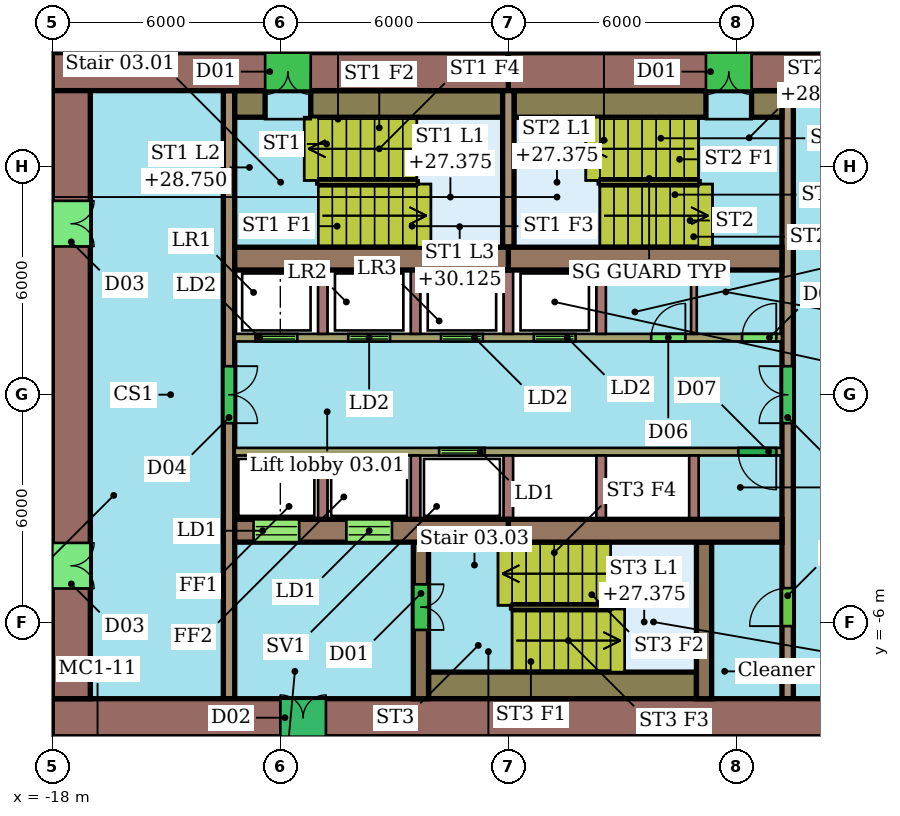
"""IFC4 building model, lengths in metres.
Left out: names, types, materials, properties, quantities, classifications, styles, units other than length and angle.
Written with IfcOpenShell. Run it as: python <this file> out.ifc"""

import sys

from ifc_helpers import new_model, si_unit, direction, frame, frame_2d, origin, place, context, subcontext, project, spatial, rectangle, extrude, element, fill, save


model = new_model("IFC4")
c1 = context("Model", 3, precision=1e-05, world=origin(), true_north=direction((0.0, 1.0)))
c2 = subcontext(c1, "Body", "Model", "MODEL_VIEW")
j1 = project(units=[si_unit("LENGTHUNIT", "METRE"), si_unit("PLANEANGLEUNIT", "RADIAN")], contexts=[c1])
p1 = place(None, origin())
s1 = spatial("IfcSite", under=j1, at=p1, CompositionType="ELEMENT")
p2 = place(p1, origin())
s2 = spatial("IfcBuilding", under=s1, at=p2, CompositionType="ELEMENT")
p3 = place(p2, frame((0.0, 0.0, 26.0)))
s3 = spatial("IfcBuildingStorey", under=s2, at=p3, CompositionType="ELEMENT", Elevation=26.0)
p4 = place(p3, frame((6.0, 8.5, 0.0), z_axis=(0.0, 0.0, 1.0), x_axis=(-1.0, 0.0, 0.0)))
e1 = element("IfcWall", 1, at=p4, inside=s3, PredefinedType="SHEAR", context=c2, shape_type="SweptSolid", body=[
    extrude(rectangle(XDim=12.0, YDim=1.0, at=frame_2d((6.0, 0.0))), origin(), (0.0, 0.0, 1.0), 5.2),
])
p5 = place(p4, frame((5.6, 0.0, 0.0)))
e2 = element("IfcOpeningElement", 2, at=p5, cuts=e1, PredefinedType="OPENING", context=c2, shape_type="SweptSolid", body=[
    extrude(rectangle(XDim=1.2, YDim=2.1, at=frame_2d((0.6, 1.05))), frame((0.0, 0.51, 0.0), z_axis=(0.0, -1.0, 0.0), x_axis=(1.0, 0.0, 0.0)), (0.0, 0.0, 1.0), 1.02),
])
p6 = place(p3, frame((-6.0, 8.5, 0.0), z_axis=(0.0, 0.0, 1.0), x_axis=(-1.0, 0.0, 0.0)))
e3 = element("IfcWall", 3, at=p6, inside=s3, PredefinedType="SHEAR", context=c2, shape_type="SweptSolid", body=[
    extrude(rectangle(XDim=12.0, YDim=1.0, at=frame_2d((6.0, 0.0))), origin(), (0.0, 0.0, 1.0), 5.2),
])
p7 = place(p6, frame((5.2, 0.0, 0.0)))
e4 = element("IfcOpeningElement", 4, at=p7, cuts=e3, PredefinedType="OPENING", context=c2, shape_type="SweptSolid", body=[
    extrude(rectangle(XDim=1.2, YDim=2.1, at=frame_2d((0.6, 1.05))), frame((0.0, 0.51, 0.0), z_axis=(0.0, -1.0, 0.0), x_axis=(1.0, 0.0, 0.0)), (0.0, 0.0, 1.0), 1.02),
])
p8 = place(p3, frame((-18.0, -8.5, 0.0), z_axis=(0.0, 0.0, 1.0), x_axis=(1.0, 0.0, 0.0)))
e5 = element("IfcWall", 5, at=p8, inside=s3, PredefinedType="SHEAR", context=c2, shape_type="SweptSolid", body=[
    extrude(rectangle(XDim=24.0, YDim=1.0, at=frame_2d((12.0, 0.0))), origin(), (0.0, 0.0, 1.0), 5.2),
])
p9 = place(p8, frame((6.0, 0.0, 0.0)))
e6 = element("IfcOpeningElement", 6, at=p9, cuts=e5, PredefinedType="OPENING", context=c2, shape_type="SweptSolid", body=[
    extrude(rectangle(XDim=1.2, YDim=2.1, at=frame_2d((0.6, 1.05))), frame((0.0, 0.51, 0.0), z_axis=(0.0, -1.0, 0.0), x_axis=(1.0, 0.0, 0.0)), (0.0, 0.0, 1.0), 1.02),
])
p10 = place(p3, frame((-17.5, 8.0, 0.0), z_axis=(0.0, 0.0, 1.0), x_axis=(0.0, -1.0, 0.0)))
e7 = element("IfcWall", 7, at=p10, inside=s3, PredefinedType="SHEAR", context=c2, shape_type="SweptSolid", body=[
    extrude(rectangle(XDim=16.0, YDim=1.0, at=frame_2d((8.0, 0.0))), origin(), (0.0, 0.0, 1.0), 5.2),
])
p11 = place(p10, frame((11.9, 0.0, 0.0)))
e8 = element("IfcOpeningElement", 8, at=p11, cuts=e7, PredefinedType="OPENING", context=c2, shape_type="SweptSolid", body=[
    extrude(rectangle(XDim=1.2, YDim=2.1, at=frame_2d((0.6, 1.05))), frame((0.0, 0.51, 0.0), z_axis=(0.0, -1.0, 0.0), x_axis=(1.0, 0.0, 0.0)), (0.0, 0.0, 1.0), 1.02),
])
p12 = place(p10, frame((2.9, 0.0, 0.0)))
e9 = element("IfcOpeningElement", 9, at=p12, cuts=e7, PredefinedType="OPENING", context=c2, shape_type="SweptSolid", body=[
    extrude(rectangle(XDim=1.2, YDim=2.1, at=frame_2d((0.6, 1.05))), frame((0.0, 0.51, 0.0), z_axis=(0.0, -1.0, 0.0), x_axis=(1.0, 0.0, 0.0)), (0.0, 0.0, 1.0), 1.02),
])
for number, where, z_axis, x_axis in (
    (10, (-13.2, 3.58, 0.0), (0.0, 0.0, 1.0), (1.0, 0.0, 0.0)),
    (11, (-6.0, 3.58, 0.0), (0.0, 0.0, 1.0), (1.0, 0.0, 0.0)),
):
    element("IfcWall", number, at=place(p3, frame(where, z_axis=z_axis, x_axis=x_axis)), inside=s3, PredefinedType="SHEAR", context=c2, shape_type="SweptSolid", body=[
        extrude(rectangle(XDim=7.2, YDim=0.6, at=frame_2d((3.6, 0.0))), origin(), (0.0, 0.0, 1.0), 5.2),
    ])
p13 = place(p3, frame((-13.2, -3.58, 0.0), z_axis=(0.0, 0.0, 1.0), x_axis=(1.0, 0.0, 0.0)))
e12 = element("IfcWall", 12, at=p13, inside=s3, PredefinedType="SHEAR", context=c2, shape_type="SweptSolid", body=[
    extrude(rectangle(XDim=7.2, YDim=0.6, at=frame_2d((3.6, 0.0))), origin(), (0.0, 0.0, 1.0), 5.2),
])
p14 = place(p13, frame((0.496, 0.0, 0.0)))
e13 = element("IfcOpeningElement", 13, at=p14, cuts=e12, PredefinedType="OPENING", context=c2, shape_type="SweptSolid", body=[
    extrude(rectangle(XDim=1.2, YDim=2.1, at=frame_2d((0.6, 1.05))), frame((0.0, 0.31, 0.0), z_axis=(0.0, -1.0, 0.0), x_axis=(1.0, 0.0, 0.0)), (0.0, 0.0, 1.0), 0.62),
])
p15 = place(p13, frame((2.938, 0.0, 0.0)))
e14 = element("IfcOpeningElement", 14, at=p15, cuts=e12, PredefinedType="OPENING", context=c2, shape_type="SweptSolid", body=[
    extrude(rectangle(XDim=1.2, YDim=2.1, at=frame_2d((0.6, 1.05))), frame((0.0, 0.31, 0.0), z_axis=(0.0, -1.0, 0.0), x_axis=(1.0, 0.0, 0.0)), (0.0, 0.0, 1.0), 0.62),
])
p16 = place(p3, frame((-6.0, -3.58, 0.0), z_axis=(0.0, 0.0, 1.0), x_axis=(1.0, 0.0, 0.0)))
e15 = element("IfcWall", 15, at=p16, inside=s3, PredefinedType="SHEAR", context=c2, shape_type="SweptSolid", body=[
    extrude(rectangle(XDim=7.2, YDim=0.6, at=frame_2d((3.6, 0.0))), origin(), (0.0, 0.0, 1.0), 5.2),
])
p17 = place(p3, frame((-13.35, 8.0, 0.0), z_axis=(0.0, 0.0, 1.0), x_axis=(0.0, -1.0, 0.0)))
e16 = element("IfcWall", 16, at=p17, inside=s3, PredefinedType="SHEAR", context=c2, shape_type="SweptSolid", body=[
    extrude(rectangle(XDim=16.0, YDim=0.3, at=frame_2d((8.0, 0.0))), origin(), (0.0, 0.0, 1.0), 5.2),
])
p18 = place(p17, frame((7.25, 0.0, 0.0)))
e17 = element("IfcOpeningElement", 17, at=p18, cuts=e16, PredefinedType="OPENING", context=c2, shape_type="SweptSolid", body=[
    extrude(rectangle(XDim=1.5, YDim=2.1, at=frame_2d((0.75, 1.05))), frame((0.0, 0.16, 0.0), z_axis=(0.0, -1.0, 0.0), x_axis=(1.0, 0.0, 0.0)), (0.0, 0.0, 1.0), 0.32),
])
p19 = place(p3, frame((1.35, -8.0, 0.0), z_axis=(0.0, 0.0, 1.0), x_axis=(0.0, 1.0, 0.0)))
e18 = element("IfcWall", 18, at=p19, inside=s3, PredefinedType="SHEAR", context=c2, shape_type="SweptSolid", body=[
    extrude(rectangle(XDim=16.0, YDim=0.3, at=frame_2d((8.0, 0.0))), origin(), (0.0, 0.0, 1.0), 5.2),
])
p20 = place(p19, frame((1.91, 0.0, 0.0)))
e19 = element("IfcOpeningElement", 19, at=p20, cuts=e18, PredefinedType="OPENING", context=c2, shape_type="SweptSolid", body=[
    extrude(rectangle(XDim=1.0, YDim=2.1, at=frame_2d((0.5, 1.05))), frame((0.0, 0.16, 0.0), z_axis=(0.0, -1.0, 0.0), x_axis=(1.0, 0.0, 0.0)), (0.0, 0.0, 1.0), 0.32),
])
p21 = place(p19, frame((7.25, 0.0, 0.0)))
e20 = element("IfcOpeningElement", 20, at=p21, cuts=e18, PredefinedType="OPENING", context=c2, shape_type="SweptSolid", body=[
    extrude(rectangle(XDim=1.5, YDim=2.1, at=frame_2d((0.75, 1.05))), frame((0.0, 0.16, 0.0), z_axis=(0.0, -1.0, 0.0), x_axis=(1.0, 0.0, 0.0)), (0.0, 0.0, 1.0), 0.32),
])
p22 = place(p3, frame((-13.2, 1.5, 0.0), z_axis=(0.0, 0.0, 1.0), x_axis=(1.0, 0.0, 0.0)))
e21 = element("IfcWall", 21, at=p22, inside=s3, PredefinedType="SHEAR", context=c2, shape_type="SweptSolid", body=[
    extrude(rectangle(XDim=14.4, YDim=0.2, at=frame_2d((7.2, 0.0))), origin(), (0.0, 0.0, 1.0), 5.2),
])
p23 = place(p22, frame((0.546, 0.0, 0.0)))
e22 = element("IfcOpeningElement", 22, at=p23, cuts=e21, PredefinedType="OPENING", context=c2, shape_type="SweptSolid", body=[
    extrude(rectangle(XDim=1.1, YDim=2.1, at=frame_2d((0.55, 1.05))), frame((0.0, 0.11, 0.0), z_axis=(0.0, -1.0, 0.0), x_axis=(1.0, 0.0, 0.0)), (0.0, 0.0, 1.0), 0.22),
])
p24 = place(p22, frame((2.988, 0.0, 0.0)))
e23 = element("IfcOpeningElement", 23, at=p24, cuts=e21, PredefinedType="OPENING", context=c2, shape_type="SweptSolid", body=[
    extrude(rectangle(XDim=1.1, YDim=2.1, at=frame_2d((0.55, 1.05))), frame((0.0, 0.11, 0.0), z_axis=(0.0, -1.0, 0.0), x_axis=(1.0, 0.0, 0.0)), (0.0, 0.0, 1.0), 0.22),
])
p25 = place(p22, frame((5.429, 0.0, 0.0)))
e24 = element("IfcOpeningElement", 24, at=p25, cuts=e21, PredefinedType="OPENING", context=c2, shape_type="SweptSolid", body=[
    extrude(rectangle(XDim=1.1, YDim=2.1, at=frame_2d((0.55, 1.05))), frame((0.0, 0.11, 0.0), z_axis=(0.0, -1.0, 0.0), x_axis=(1.0, 0.0, 0.0)), (0.0, 0.0, 1.0), 0.22),
])
p26 = place(p22, frame((7.871, 0.0, 0.0)))
e25 = element("IfcOpeningElement", 25, at=p26, cuts=e21, PredefinedType="OPENING", context=c2, shape_type="SweptSolid", body=[
    extrude(rectangle(XDim=1.1, YDim=2.1, at=frame_2d((0.55, 1.05))), frame((0.0, 0.11, 0.0), z_axis=(0.0, -1.0, 0.0), x_axis=(1.0, 0.0, 0.0)), (0.0, 0.0, 1.0), 0.22),
])
p27 = place(p22, frame((10.958, 0.0, 0.0)))
e26 = element("IfcOpeningElement", 26, at=p27, cuts=e21, PredefinedType="OPENING", context=c2, shape_type="SweptSolid", body=[
    extrude(rectangle(XDim=0.9, YDim=2.1, at=frame_2d((0.45, 1.05))), frame((0.0, 0.11, 0.0), z_axis=(0.0, -1.0, 0.0), x_axis=(1.0, 0.0, 0.0)), (0.0, 0.0, 1.0), 0.22),
])
p28 = place(p22, frame((13.35, 0.0, 0.0)))
e27 = element("IfcOpeningElement", 27, at=p28, cuts=e21, PredefinedType="OPENING", context=c2, shape_type="SweptSolid", body=[
    extrude(rectangle(XDim=0.9, YDim=2.1, at=frame_2d((0.45, 1.05))), frame((0.0, 0.11, 0.0), z_axis=(0.0, -1.0, 0.0), x_axis=(1.0, 0.0, 0.0)), (0.0, 0.0, 1.0), 0.22),
])
p29 = place(p3, frame((1.2, -1.5, 0.0), z_axis=(0.0, 0.0, 1.0), x_axis=(-1.0, 0.0, 0.0)))
e28 = element("IfcWall", 28, at=p29, inside=s3, PredefinedType="SHEAR", context=c2, shape_type="SweptSolid", body=[
    extrude(rectangle(XDim=14.4, YDim=0.2, at=frame_2d((7.2, 0.0))), origin(), (0.0, 0.0, 1.0), 5.2),
])
p30 = place(p29, frame((7.821, 0.0, 0.0)))
e29 = element("IfcOpeningElement", 29, at=p30, cuts=e28, PredefinedType="OPENING", context=c2, shape_type="SweptSolid", body=[
    extrude(rectangle(XDim=1.2, YDim=2.1, at=frame_2d((0.6, 1.05))), frame((0.0, 0.11, 0.0), z_axis=(0.0, -1.0, 0.0), x_axis=(1.0, 0.0, 0.0)), (0.0, 0.0, 1.0), 0.22),
])
p31 = place(p29, frame((0.15, 0.0, 0.0)))
e30 = element("IfcOpeningElement", 30, at=p31, cuts=e28, PredefinedType="OPENING", context=c2, shape_type="SweptSolid", body=[
    extrude(rectangle(XDim=1.0, YDim=2.1, at=frame_2d((0.5, 1.05))), frame((0.0, 0.11, 0.0), z_axis=(0.0, -1.0, 0.0), x_axis=(1.0, 0.0, 0.0)), (0.0, 0.0, 1.0), 0.22),
])
p32 = place(p3, frame((-8.3, -3.88, 0.0), z_axis=(0.0, 0.0, 1.0), x_axis=(0.0, -1.0, 0.0)))
e31 = element("IfcWall", 31, at=p32, inside=s3, PredefinedType="SHEAR", context=c2, shape_type="SweptSolid", body=[
    extrude(rectangle(XDim=4.12, YDim=0.4, at=frame_2d((2.06, 0.0))), origin(), (0.0, 0.0, 1.0), 5.2),
])
p33 = place(p32, frame((1.11, 0.0, 0.0)))
e32 = element("IfcOpeningElement", 32, at=p33, cuts=e31, PredefinedType="OPENING", context=c2, shape_type="SweptSolid", body=[
    extrude(rectangle(XDim=1.2, YDim=2.1, at=frame_2d((0.6, 1.05))), frame((0.0, 0.21, 0.0), z_axis=(0.0, -1.0, 0.0), x_axis=(1.0, 0.0, 0.0)), (0.0, 0.0, 1.0), 0.42),
])
p34 = place(p3, frame((-0.85, -3.88, 0.0), z_axis=(0.0, 0.0, 1.0), x_axis=(0.0, -1.0, 0.0)))
e33 = element("IfcWall", 33, at=p34, inside=s3, PredefinedType="SHEAR", context=c2, shape_type="SweptSolid", body=[
    extrude(rectangle(XDim=4.12, YDim=0.4, at=frame_2d((2.06, 0.0))), origin(), (0.0, 0.0, 1.0), 5.2),
])
p35 = place(p3, frame((-6.0, 3.88, 0.0), z_axis=(0.0, 0.0, 1.0), x_axis=(0.0, 1.0, 0.0)))
e34 = element("IfcWall", 34, at=p35, inside=s3, PredefinedType="SHEAR", context=c2, shape_type="SweptSolid", body=[
    extrude(rectangle(XDim=4.12, YDim=0.3, at=frame_2d((2.06, 0.0))), origin(), (0.0, 0.0, 1.0), 5.2),
])
p36 = place(p3, frame((-13.2, 7.65, 0.0), z_axis=(0.0, 0.0, 1.0), x_axis=(1.0, 0.0, 0.0)))
e35 = element("IfcWall", 35, at=p36, inside=s3, PredefinedType="SHEAR", context=c2, shape_type="SweptSolid", body=[
    extrude(rectangle(XDim=0.8, YDim=0.7, at=frame_2d((0.4, 0.0))), origin(), (0.0, 0.0, 1.0), 5.2),
])
for number, where, z_axis, x_axis in (
    (36, (-11.2, 7.65, 0.0), (0.0, 0.0, 1.0), (1.0, 0.0, 0.0)),
    (37, (-5.85, 7.65, 0.0), (0.0, 0.0, 1.0), (1.0, 0.0, 0.0)),
):
    element("IfcWall", number, at=place(p3, frame(where, z_axis=z_axis, x_axis=x_axis)), inside=s3, PredefinedType="SHEAR", context=c2, shape_type="SweptSolid", body=[
        extrude(rectangle(XDim=5.05, YDim=0.7, at=frame_2d((2.525, 0.0))), origin(), (0.0, 0.0, 1.0), 5.2),
    ])
p37 = place(p3, frame((0.4, 7.65, 0.0), z_axis=(0.0, 0.0, 1.0), x_axis=(1.0, 0.0, 0.0)))
e38 = element("IfcWall", 38, at=p37, inside=s3, PredefinedType="SHEAR", context=c2, shape_type="SweptSolid", body=[
    extrude(rectangle(XDim=0.8, YDim=0.7, at=frame_2d((0.4, 0.0))), origin(), (0.0, 0.0, 1.0), 5.2),
])
p38 = place(p3, frame((-8.1, -7.65, 0.0), z_axis=(0.0, 0.0, 1.0), x_axis=(1.0, 0.0, 0.0)))
e39 = element("IfcWall", 39, at=p38, inside=s3, PredefinedType="SHEAR", context=c2, shape_type="SweptSolid", body=[
    extrude(rectangle(XDim=7.05, YDim=0.7, at=frame_2d((3.525, 0.0))), origin(), (0.0, 0.0, 1.0), 5.2),
])
for number, where, z_axis, x_axis in (
    (40, (-10.883, 1.6, 0.0), (0.0, 0.0, 1.0), (0.0, 1.0, 0.0)),
    (41, (-8.442, 1.6, 0.0), (0.0, 0.0, 1.0), (0.0, 1.0, 0.0)),
    (42, (-6.0, 1.6, 0.0), (0.0, 0.0, 1.0), (0.0, 1.0, 0.0)),
    (43, (-3.558, 1.6, 0.0), (0.0, 0.0, 1.0), (0.0, 1.0, 0.0)),
):
    element("IfcWall", number, at=place(p3, frame(where, z_axis=z_axis, x_axis=x_axis)), inside=s3, PredefinedType="SHEAR", context=c2, shape_type="SweptSolid", body=[
        extrude(rectangle(XDim=1.68, YDim=0.25, at=frame_2d((0.84, 0.0))), origin(), (0.0, 0.0, 1.0), 5.2),
    ])
p39 = place(p3, frame((-1.117, 1.6, 0.0), z_axis=(0.0, 0.0, 1.0), x_axis=(0.0, 1.0, 0.0)))
e44 = element("IfcWall", 44, at=p39, inside=s3, PredefinedType="PARTITIONING", context=c2, shape_type="SweptSolid", body=[
    extrude(rectangle(XDim=1.68, YDim=0.15, at=frame_2d((0.84, 0.0))), origin(), (0.0, 0.0, 1.0), 5.2),
])
for number, where, z_axis, x_axis in (
    (45, (-10.883, -1.6, 0.0), (0.0, 0.0, 1.0), (0.0, -1.0, 0.0)),
    (46, (-8.442, -1.6, 0.0), (0.0, 0.0, 1.0), (0.0, -1.0, 0.0)),
    (47, (-6.0, -1.6, 0.0), (0.0, 0.0, 1.0), (0.0, -1.0, 0.0)),
    (48, (-3.558, -1.6, 0.0), (0.0, 0.0, 1.0), (0.0, -1.0, 0.0)),
    (49, (-1.117, -1.6, 0.0), (0.0, 0.0, 1.0), (0.0, -1.0, 0.0)),
):
    element("IfcWall", number, at=place(p3, frame(where, z_axis=z_axis, x_axis=x_axis)), inside=s3, PredefinedType="SHEAR", context=c2, shape_type="SweptSolid", body=[
        extrude(rectangle(XDim=1.68, YDim=0.25, at=frame_2d((0.84, 0.0))), origin(), (0.0, 0.0, 1.0), 5.2),
    ])
p40 = place(p5, origin())
e50 = element("IfcDoor", 50, at=p40, inside=s3, OperationType="DOUBLE_DOOR_SINGLE_SWING", PredefinedType="NOTDEFINED", context=c2, shape_type="SweptSolid", body=[
    extrude(rectangle(XDim=1.2, YDim=2.1, at=frame_2d((0.6, 1.05))), frame((0.0, 0.025, 0.0), z_axis=(0.0, -1.0, 0.0), x_axis=(1.0, 0.0, 0.0)), (0.0, 0.0, 1.0), 0.05),
])
fill(e2, e50)
p41 = place(p7, origin())
e51 = element("IfcDoor", 51, at=p41, inside=s3, OperationType="DOUBLE_DOOR_SINGLE_SWING", PredefinedType="NOTDEFINED", context=c2, shape_type="SweptSolid", body=[
    extrude(rectangle(XDim=1.2, YDim=2.1, at=frame_2d((0.6, 1.05))), frame((0.0, 0.025, 0.0), z_axis=(0.0, -1.0, 0.0), x_axis=(1.0, 0.0, 0.0)), (0.0, 0.0, 1.0), 0.05),
])
fill(e4, e51)
p42 = place(p9, origin())
e52 = element("IfcDoor", 52, at=p42, inside=s3, OperationType="DOUBLE_DOOR_SINGLE_SWING", PredefinedType="NOTDEFINED", context=c2, shape_type="SweptSolid", body=[
    extrude(rectangle(XDim=1.2, YDim=2.1, at=frame_2d((0.6, 1.05))), frame((0.0, 0.025, 0.0), z_axis=(0.0, -1.0, 0.0), x_axis=(1.0, 0.0, 0.0)), (0.0, 0.0, 1.0), 0.05),
])
fill(e6, e52)
p43 = place(p11, origin())
e53 = element("IfcDoor", 53, at=p43, inside=s3, OperationType="DOUBLE_DOOR_SINGLE_SWING", PredefinedType="NOTDEFINED", context=c2, shape_type="SweptSolid", body=[
    extrude(rectangle(XDim=1.2, YDim=2.1, at=frame_2d((0.6, 1.05))), frame((0.0, 0.025, 0.0), z_axis=(0.0, -1.0, 0.0), x_axis=(1.0, 0.0, 0.0)), (0.0, 0.0, 1.0), 0.05),
])
fill(e8, e53)
p44 = place(p12, origin())
e54 = element("IfcDoor", 54, at=p44, inside=s3, OperationType="DOUBLE_DOOR_SINGLE_SWING", PredefinedType="NOTDEFINED", context=c2, shape_type="SweptSolid", body=[
    extrude(rectangle(XDim=1.2, YDim=2.1, at=frame_2d((0.6, 1.05))), frame((0.0, 0.025, 0.0), z_axis=(0.0, -1.0, 0.0), x_axis=(1.0, 0.0, 0.0)), (0.0, 0.0, 1.0), 0.05),
])
fill(e9, e54)
p45 = place(p14, origin())
e55 = element("IfcDoor", 55, at=p45, inside=s3, OperationType="DOUBLE_DOOR_SLIDING", PredefinedType="NOTDEFINED", context=c2, shape_type="SweptSolid", body=[
    extrude(rectangle(XDim=1.2, YDim=2.1, at=frame_2d((0.6, 1.05))), frame((0.0, 0.025, 0.0), z_axis=(0.0, -1.0, 0.0), x_axis=(1.0, 0.0, 0.0)), (0.0, 0.0, 1.0), 0.05),
])
fill(e13, e55)
p46 = place(p15, origin())
e56 = element("IfcDoor", 56, at=p46, inside=s3, OperationType="DOUBLE_DOOR_SLIDING", PredefinedType="NOTDEFINED", context=c2, shape_type="SweptSolid", body=[
    extrude(rectangle(XDim=1.2, YDim=2.1, at=frame_2d((0.6, 1.05))), frame((0.0, 0.025, 0.0), z_axis=(0.0, -1.0, 0.0), x_axis=(1.0, 0.0, 0.0)), (0.0, 0.0, 1.0), 0.05),
])
fill(e14, e56)
p47 = place(p18, origin())
e57 = element("IfcDoor", 57, at=p47, inside=s3, OperationType="DOUBLE_DOOR_SINGLE_SWING", PredefinedType="NOTDEFINED", context=c2, shape_type="SweptSolid", body=[
    extrude(rectangle(XDim=1.5, YDim=2.1, at=frame_2d((0.75, 1.05))), frame((0.0, 0.025, 0.0), z_axis=(0.0, -1.0, 0.0), x_axis=(1.0, 0.0, 0.0)), (0.0, 0.0, 1.0), 0.05),
])
fill(e17, e57)
p48 = place(p20, origin())
e58 = element("IfcDoor", 58, at=p48, inside=s3, OperationType="SINGLE_SWING_LEFT", PredefinedType="NOTDEFINED", context=c2, shape_type="SweptSolid", body=[
    extrude(rectangle(XDim=1.0, YDim=2.1, at=frame_2d((0.5, 1.05))), frame((0.0, 0.025, 0.0), z_axis=(0.0, -1.0, 0.0), x_axis=(1.0, 0.0, 0.0)), (0.0, 0.0, 1.0), 0.05),
])
fill(e19, e58)
p49 = place(p21, origin())
e59 = element("IfcDoor", 59, at=p49, inside=s3, OperationType="DOUBLE_DOOR_SINGLE_SWING", PredefinedType="NOTDEFINED", context=c2, shape_type="SweptSolid", body=[
    extrude(rectangle(XDim=1.5, YDim=2.1, at=frame_2d((0.75, 1.05))), frame((0.0, 0.025, 0.0), z_axis=(0.0, -1.0, 0.0), x_axis=(1.0, 0.0, 0.0)), (0.0, 0.0, 1.0), 0.05),
])
fill(e20, e59)
p50 = place(p23, origin())
e60 = element("IfcDoor", 60, at=p50, inside=s3, OperationType="DOUBLE_DOOR_SLIDING", PredefinedType="NOTDEFINED", context=c2, shape_type="SweptSolid", body=[
    extrude(rectangle(XDim=1.1, YDim=2.1, at=frame_2d((0.55, 1.05))), frame((0.0, 0.025, 0.0), z_axis=(0.0, -1.0, 0.0), x_axis=(1.0, 0.0, 0.0)), (0.0, 0.0, 1.0), 0.05),
])
fill(e22, e60)
p51 = place(p24, origin())
e61 = element("IfcDoor", 61, at=p51, inside=s3, OperationType="DOUBLE_DOOR_SLIDING", PredefinedType="NOTDEFINED", context=c2, shape_type="SweptSolid", body=[
    extrude(rectangle(XDim=1.1, YDim=2.1, at=frame_2d((0.55, 1.05))), frame((0.0, 0.025, 0.0), z_axis=(0.0, -1.0, 0.0), x_axis=(1.0, 0.0, 0.0)), (0.0, 0.0, 1.0), 0.05),
])
fill(e23, e61)
p52 = place(p25, origin())
e62 = element("IfcDoor", 62, at=p52, inside=s3, OperationType="DOUBLE_DOOR_SLIDING", PredefinedType="NOTDEFINED", context=c2, shape_type="SweptSolid", body=[
    extrude(rectangle(XDim=1.1, YDim=2.1, at=frame_2d((0.55, 1.05))), frame((0.0, 0.025, 0.0), z_axis=(0.0, -1.0, 0.0), x_axis=(1.0, 0.0, 0.0)), (0.0, 0.0, 1.0), 0.05),
])
fill(e24, e62)
p53 = place(p26, origin())
e63 = element("IfcDoor", 63, at=p53, inside=s3, OperationType="DOUBLE_DOOR_SLIDING", PredefinedType="NOTDEFINED", context=c2, shape_type="SweptSolid", body=[
    extrude(rectangle(XDim=1.1, YDim=2.1, at=frame_2d((0.55, 1.05))), frame((0.0, 0.025, 0.0), z_axis=(0.0, -1.0, 0.0), x_axis=(1.0, 0.0, 0.0)), (0.0, 0.0, 1.0), 0.05),
])
fill(e25, e63)
p54 = place(p27, origin())
e64 = element("IfcDoor", 64, at=p54, inside=s3, OperationType="SINGLE_SWING_RIGHT", PredefinedType="NOTDEFINED", context=c2, shape_type="SweptSolid", body=[
    extrude(rectangle(XDim=0.9, YDim=2.1, at=frame_2d((0.45, 1.05))), frame((0.0, 0.025, 0.0), z_axis=(0.0, -1.0, 0.0), x_axis=(1.0, 0.0, 0.0)), (0.0, 0.0, 1.0), 0.05),
])
fill(e26, e64)
p55 = place(p28, origin())
e65 = element("IfcDoor", 65, at=p55, inside=s3, OperationType="SINGLE_SWING_RIGHT", PredefinedType="NOTDEFINED", context=c2, shape_type="SweptSolid", body=[
    extrude(rectangle(XDim=0.9, YDim=2.1, at=frame_2d((0.45, 1.05))), frame((0.0, 0.025, 0.0), z_axis=(0.0, -1.0, 0.0), x_axis=(1.0, 0.0, 0.0)), (0.0, 0.0, 1.0), 0.05),
])
fill(e27, e65)
p56 = place(p30, origin())
e66 = element("IfcDoor", 66, at=p56, inside=s3, OperationType="DOUBLE_DOOR_SLIDING", PredefinedType="NOTDEFINED", context=c2, shape_type="SweptSolid", body=[
    extrude(rectangle(XDim=1.2, YDim=2.1, at=frame_2d((0.6, 1.05))), frame((0.0, 0.025, 0.0), z_axis=(0.0, -1.0, 0.0), x_axis=(1.0, 0.0, 0.0)), (0.0, 0.0, 1.0), 0.05),
])
fill(e29, e66)
p57 = place(p31, origin())
e67 = element("IfcDoor", 67, at=p57, inside=s3, OperationType="SINGLE_SWING_LEFT", PredefinedType="NOTDEFINED", context=c2, shape_type="SweptSolid", body=[
    extrude(rectangle(XDim=1.0, YDim=2.1, at=frame_2d((0.5, 1.05))), frame((0.0, 0.025, 0.0), z_axis=(0.0, -1.0, 0.0), x_axis=(1.0, 0.0, 0.0)), (0.0, 0.0, 1.0), 0.05),
])
fill(e30, e67)
p58 = place(p33, origin())
e68 = element("IfcDoor", 68, at=p58, inside=s3, OperationType="DOUBLE_DOOR_SINGLE_SWING", PredefinedType="NOTDEFINED", context=c2, shape_type="SweptSolid", body=[
    extrude(rectangle(XDim=1.2, YDim=2.1, at=frame_2d((0.6, 1.05))), frame((0.0, 0.025, 0.0), z_axis=(0.0, -1.0, 0.0), x_axis=(1.0, 0.0, 0.0)), (0.0, 0.0, 1.0), 0.05),
])
fill(e32, e68)
save(model, sys.argv[1])
